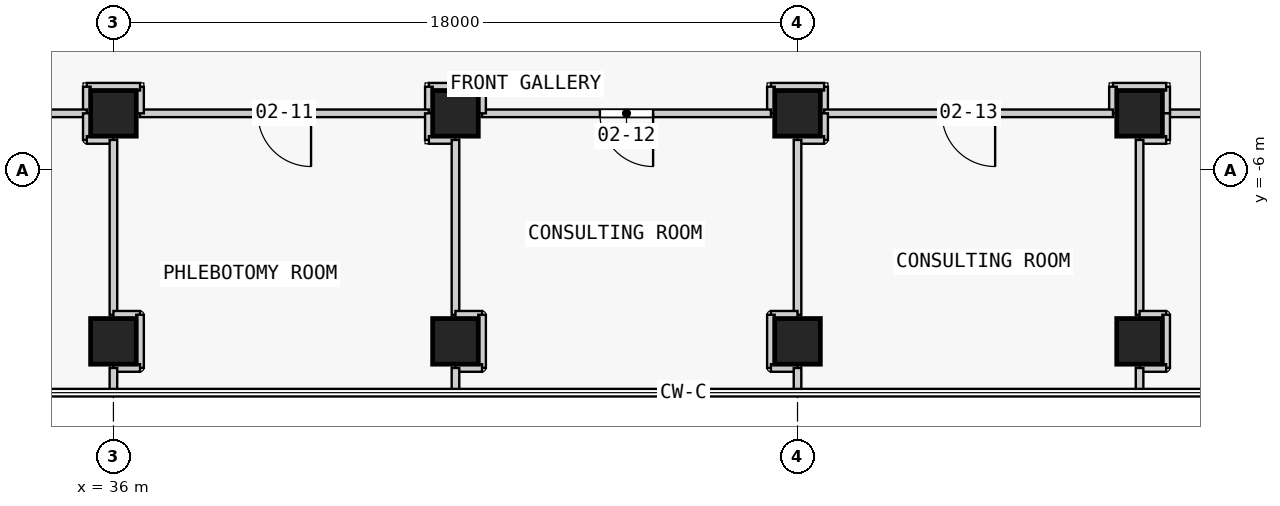
"""IFC4 building model, lengths in metres.
Left out: names, types, materials, properties, quantities, classifications, styles, units other than length and angle.
Written with IfcOpenShell. Run it as: python <this file> out.ifc"""

import sys

from ifc_helpers import new_model, si_unit, direction, frame, frame_2d, origin, origin_2d, place, context, subcontext, project, spatial, rectangle, extrude, element, fill, save


model = new_model("IFC4")
c1 = context("Model", 3, precision=1e-05, world=origin(), true_north=direction((0.0, 1.0)))
c2 = subcontext(c1, "Body", "Model", "MODEL_VIEW")
j1 = project(units=[si_unit("LENGTHUNIT", "METRE"), si_unit("PLANEANGLEUNIT", "RADIAN")], contexts=[c1])
p1 = place(None, origin())
s1 = spatial("IfcSite", under=j1, at=p1, CompositionType="ELEMENT")
p2 = place(p1, origin())
s2 = spatial("IfcBuilding", under=s1, at=p2, CompositionType="ELEMENT")
p3 = place(p2, frame((0.0, 0.0, 12.8)))
s3 = spatial("IfcBuildingStorey", under=s2, at=p3, CompositionType="ELEMENT", Elevation=12.8)
for number, where, z_axis, x_axis in (
    (1, (36.0, -10.5, 0.0), (0.0, 0.0, 1.0), (1.0, 0.0, 0.0)),
    (2, (36.0, -4.5, 0.0), (0.0, 0.0, 1.0), (1.0, 0.0, 0.0)),
    (3, (45.0, -10.5, 0.0), (0.0, 0.0, 1.0), (1.0, 0.0, 0.0)),
    (4, (45.0, -4.5, 0.0), (0.0, 0.0, 1.0), (1.0, 0.0, 0.0)),
    (5, (54.0, -10.5, 0.0), (0.0, 0.0, 1.0), (1.0, 0.0, 0.0)),
    (6, (54.0, -4.5, 0.0), (0.0, 0.0, 1.0), (1.0, 0.0, 0.0)),
    (7, (63.0, -10.5, 0.0), (0.0, 0.0, 1.0), (1.0, 0.0, 0.0)),
    (8, (63.0, -4.5, 0.0), (0.0, 0.0, 1.0), (1.0, 0.0, 0.0)),
):
    element("IfcColumn", number, at=place(p3, frame(where, z_axis=z_axis, x_axis=x_axis)), inside=s3, PredefinedType="COLUMN", context=c2, shape_type="SweptSolid", body=[
        extrude(rectangle(XDim=1.2, YDim=1.2, at=origin_2d()), origin(), (0.0, 0.0, 1.0), 4.5),
    ])
p4 = place(p3, frame((54.7, -4.5, 0.0), z_axis=(0.0, 0.0, 1.0), x_axis=(0.0, 1.0, 0.0)))
e9 = element("IfcWall", 9, at=p4, inside=s3, PredefinedType="PARTITIONING", context=c2, shape_type="SweptSolid", body=[
    extrude(rectangle(XDim=0.7, YDim=0.2, at=frame_2d((0.35, 0.0))), origin(), (0.0, 0.0, 1.0), 3.45),
])
p5 = place(p3, frame((54.7, -3.8, 0.0), z_axis=(0.0, 0.0, 1.0), x_axis=(-1.0, 0.0, 0.0)))
e10 = element("IfcWall", 10, at=p5, inside=s3, PredefinedType="PARTITIONING", context=c2, shape_type="SweptSolid", body=[
    extrude(rectangle(XDim=1.4, YDim=0.2, at=frame_2d((0.7, 0.0))), origin(), (0.0, 0.0, 1.0), 3.45),
])
p6 = place(p3, frame((53.3, -3.8, 0.0), z_axis=(0.0, 0.0, 1.0), x_axis=(0.0, -1.0, 0.0)))
e11 = element("IfcWall", 11, at=p6, inside=s3, PredefinedType="PARTITIONING", context=c2, shape_type="SweptSolid", body=[
    extrude(rectangle(XDim=0.7, YDim=0.2, at=frame_2d((0.35, 0.0))), origin(), (0.0, 0.0, 1.0), 3.45),
])
p7 = place(p3, frame((53.3, -4.5, 0.0), z_axis=(0.0, 0.0, 1.0), x_axis=(-1.0, 0.0, 0.0)))
e12 = element("IfcWall", 12, at=p7, inside=s3, PredefinedType="PARTITIONING", context=c2, shape_type="SweptSolid", body=[
    extrude(rectangle(XDim=7.6, YDim=0.2, at=frame_2d((3.8, 0.0))), origin(), (0.0, 0.0, 1.0), 3.45),
])
p8 = place(p7, frame((3.1, 0.0, 0.0)))
e13 = element("IfcOpeningElement", 13, at=p8, cuts=e12, PredefinedType="OPENING", context=c2, shape_type="SweptSolid", body=[
    extrude(rectangle(XDim=1.4, YDim=2.1, at=frame_2d((0.7, 1.05))), frame((0.0, 0.11, 0.0), z_axis=(0.0, -1.0, 0.0), x_axis=(1.0, 0.0, 0.0)), (0.0, 0.0, 1.0), 0.22),
])
p9 = place(p3, frame((45.7, -4.5, 0.0), z_axis=(0.0, 0.0, 1.0), x_axis=(0.0, 1.0, 0.0)))
e14 = element("IfcWall", 14, at=p9, inside=s3, PredefinedType="PARTITIONING", context=c2, shape_type="SweptSolid", body=[
    extrude(rectangle(XDim=0.7, YDim=0.2, at=frame_2d((0.35, 0.0))), origin(), (0.0, 0.0, 1.0), 3.45),
])
p10 = place(p3, frame((45.7, -3.8, 0.0), z_axis=(0.0, 0.0, 1.0), x_axis=(-1.0, 0.0, 0.0)))
e15 = element("IfcWall", 15, at=p10, inside=s3, PredefinedType="PARTITIONING", context=c2, shape_type="SweptSolid", body=[
    extrude(rectangle(XDim=1.4, YDim=0.2, at=frame_2d((0.7, 0.0))), origin(), (0.0, 0.0, 1.0), 3.45),
])
p11 = place(p3, frame((44.3, -3.8, 0.0), z_axis=(0.0, 0.0, 1.0), x_axis=(0.0, -1.0, 0.0)))
e16 = element("IfcWall", 16, at=p11, inside=s3, PredefinedType="PARTITIONING", context=c2, shape_type="SweptSolid", body=[
    extrude(rectangle(XDim=0.7, YDim=0.2, at=frame_2d((0.35, 0.0))), origin(), (0.0, 0.0, 1.0), 3.45),
])
p12 = place(p3, frame((74.0, -4.5, 0.0), z_axis=(0.0, 0.0, 1.0), x_axis=(-1.0, 0.0, 0.0)))
e17 = element("IfcWall", 17, at=p12, inside=s3, PredefinedType="PARTITIONING", context=c2, shape_type="SweptSolid", body=[
    extrude(rectangle(XDim=10.3, YDim=0.2, at=frame_2d((5.15, 0.0))), origin(), (0.0, 0.0, 1.0), 4.15),
])
p13 = place(p12, frame((4.35, 0.0, 0.0)))
e18 = element("IfcOpeningElement", 18, at=p13, cuts=e17, PredefinedType="OPENING", context=c2, shape_type="SweptSolid", body=[
    extrude(rectangle(XDim=1.4, YDim=2.1, at=frame_2d((0.7, 1.05))), frame((0.0, 0.11, 0.0), z_axis=(0.0, -1.0, 0.0), x_axis=(1.0, 0.0, 0.0)), (0.0, 0.0, 1.0), 0.22),
])
p14 = place(p3, frame((44.3, -4.5, 0.0), z_axis=(0.0, 0.0, 1.0), x_axis=(-1.0, 0.0, 0.0)))
e19 = element("IfcWall", 19, at=p14, inside=s3, PredefinedType="PARTITIONING", context=c2, shape_type="SweptSolid", body=[
    extrude(rectangle(XDim=7.6, YDim=0.2, at=frame_2d((3.8, 0.0))), origin(), (0.0, 0.0, 1.0), 3.45),
])
p15 = place(p14, frame((3.1, 0.0, 0.0)))
e20 = element("IfcOpeningElement", 20, at=p15, cuts=e19, PredefinedType="OPENING", context=c2, shape_type="SweptSolid", body=[
    extrude(rectangle(XDim=1.4, YDim=2.1, at=frame_2d((0.7, 1.05))), frame((0.0, 0.11, 0.0), z_axis=(0.0, -1.0, 0.0), x_axis=(1.0, 0.0, 0.0)), (0.0, 0.0, 1.0), 0.22),
])
p16 = place(p3, frame((36.7, -4.5, 0.0), z_axis=(0.0, 0.0, 1.0), x_axis=(0.0, 1.0, 0.0)))
e21 = element("IfcWall", 21, at=p16, inside=s3, PredefinedType="PARTITIONING", context=c2, shape_type="SweptSolid", body=[
    extrude(rectangle(XDim=0.7, YDim=0.2, at=frame_2d((0.35, 0.0))), origin(), (0.0, 0.0, 1.0), 3.45),
])
p17 = place(p3, frame((36.7, -3.8, 0.0), z_axis=(0.0, 0.0, 1.0), x_axis=(-1.0, 0.0, 0.0)))
e22 = element("IfcWall", 22, at=p17, inside=s3, PredefinedType="PARTITIONING", context=c2, shape_type="SweptSolid", body=[
    extrude(rectangle(XDim=1.4, YDim=0.2, at=frame_2d((0.7, 0.0))), origin(), (0.0, 0.0, 1.0), 3.45),
])
p18 = place(p3, frame((35.3, -3.8, 0.0), z_axis=(0.0, 0.0, 1.0), x_axis=(0.0, -1.0, 0.0)))
e23 = element("IfcWall", 23, at=p18, inside=s3, PredefinedType="PARTITIONING", context=c2, shape_type="SweptSolid", body=[
    extrude(rectangle(XDim=0.7, YDim=0.2, at=frame_2d((0.35, 0.0))), origin(), (0.0, 0.0, 1.0), 3.45),
])
p19 = place(p3, frame((63.7, -4.5, 0.0), z_axis=(0.0, 0.0, 1.0), x_axis=(0.0, 1.0, 0.0)))
e24 = element("IfcWall", 24, at=p19, inside=s3, PredefinedType="PARTITIONING", context=c2, shape_type="SweptSolid", body=[
    extrude(rectangle(XDim=0.7, YDim=0.2, at=frame_2d((0.35, 0.0))), origin(), (0.0, 0.0, 1.0), 4.15),
])
p20 = place(p3, frame((63.7, -3.8, 0.0), z_axis=(0.0, 0.0, 1.0), x_axis=(-1.0, 0.0, 0.0)))
e25 = element("IfcWall", 25, at=p20, inside=s3, PredefinedType="PARTITIONING", context=c2, shape_type="SweptSolid", body=[
    extrude(rectangle(XDim=1.4, YDim=0.2, at=frame_2d((0.7, 0.0))), origin(), (0.0, 0.0, 1.0), 3.45),
])
p21 = place(p3, frame((62.3, -3.8, 0.0), z_axis=(0.0, 0.0, 1.0), x_axis=(0.0, -1.0, 0.0)))
e26 = element("IfcWall", 26, at=p21, inside=s3, PredefinedType="PARTITIONING", context=c2, shape_type="SweptSolid", body=[
    extrude(rectangle(XDim=0.7, YDim=0.2, at=frame_2d((0.35, 0.0))), origin(), (0.0, 0.0, 1.0), 3.45),
])
p22 = place(p3, frame((62.3, -4.5, 0.0), z_axis=(0.0, 0.0, 1.0), x_axis=(-1.0, 0.0, 0.0)))
e27 = element("IfcWall", 27, at=p22, inside=s3, PredefinedType="PARTITIONING", context=c2, shape_type="SweptSolid", body=[
    extrude(rectangle(XDim=7.6, YDim=0.2, at=frame_2d((3.8, 0.0))), origin(), (0.0, 0.0, 1.0), 3.45),
])
p23 = place(p22, frame((3.1, 0.0, 0.0)))
e28 = element("IfcOpeningElement", 28, at=p23, cuts=e27, PredefinedType="OPENING", context=c2, shape_type="SweptSolid", body=[
    extrude(rectangle(XDim=1.4, YDim=2.1, at=frame_2d((0.7, 1.05))), frame((0.0, 0.11, 0.0), z_axis=(0.0, -1.0, 0.0), x_axis=(1.0, 0.0, 0.0)), (0.0, 0.0, 1.0), 0.22),
])
p24 = place(p3, frame((35.3, -4.5, 0.0), z_axis=(0.0, 0.0, 1.0), x_axis=(-1.0, 0.0, 0.0)))
e29 = element("IfcWall", 29, at=p24, inside=s3, PredefinedType="PARTITIONING", context=c2, shape_type="SweptSolid", body=[
    extrude(rectangle(XDim=7.6, YDim=0.2, at=frame_2d((3.8, 0.0))), origin(), (0.0, 0.0, 1.0), 3.45),
])
p25 = place(p24, frame((3.1, 0.0, 0.0)))
e30 = element("IfcOpeningElement", 30, at=p25, cuts=e29, PredefinedType="OPENING", context=c2, shape_type="SweptSolid", body=[
    extrude(rectangle(XDim=1.4, YDim=2.1, at=frame_2d((0.7, 1.05))), frame((0.0, 0.11, 0.0), z_axis=(0.0, -1.0, 0.0), x_axis=(1.0, 0.0, 0.0)), (0.0, 0.0, 1.0), 0.22),
])
for number, where, z_axis, x_axis in (
    (31, (44.3, -4.5, 0.0), (0.0, 0.0, 1.0), (0.0, -1.0, 0.0)),
    (32, (44.3, -5.2, 0.0), (0.0, 0.0, 1.0), (1.0, 0.0, 0.0)),
):
    element("IfcWall", number, at=place(p3, frame(where, z_axis=z_axis, x_axis=x_axis)), inside=s3, PredefinedType="PARTITIONING", context=c2, shape_type="SweptSolid", body=[
        extrude(rectangle(XDim=0.7, YDim=0.2, at=frame_2d((0.35, 0.0))), origin(), (0.0, 0.0, 1.0), 3.45),
    ])
p26 = place(p3, frame((45.0, -5.2, 0.0), z_axis=(0.0, 0.0, 1.0), x_axis=(0.0, -1.0, 0.0)))
e33 = element("IfcWall", 33, at=p26, inside=s3, PredefinedType="PARTITIONING", context=c2, shape_type="SweptSolid", body=[
    extrude(rectangle(XDim=4.6, YDim=0.2, at=frame_2d((2.3, 0.0))), origin(), (0.0, 0.0, 1.0), 3.45),
])
p27 = place(p3, frame((45.0, -9.8, 0.0), z_axis=(0.0, 0.0, 1.0), x_axis=(1.0, 0.0, 0.0)))
e34 = element("IfcWall", 34, at=p27, inside=s3, PredefinedType="PARTITIONING", context=c2, shape_type="SweptSolid", body=[
    extrude(rectangle(XDim=0.7, YDim=0.2, at=frame_2d((0.35, 0.0))), origin(), (0.0, 0.0, 1.0), 3.45),
])
p28 = place(p3, frame((45.7, -9.8, 0.0), z_axis=(0.0, 0.0, 1.0), x_axis=(0.0, -1.0, 0.0)))
e35 = element("IfcWall", 35, at=p28, inside=s3, PredefinedType="PARTITIONING", context=c2, shape_type="SweptSolid", body=[
    extrude(rectangle(XDim=1.4, YDim=0.2, at=frame_2d((0.7, 0.0))), origin(), (0.0, 0.0, 1.0), 3.45),
])
p29 = place(p3, frame((45.7, -11.2, 0.0), z_axis=(0.0, 0.0, 1.0), x_axis=(-1.0, 0.0, 0.0)))
e36 = element("IfcWall", 36, at=p29, inside=s3, PredefinedType="PARTITIONING", context=c2, shape_type="SweptSolid", body=[
    extrude(rectangle(XDim=0.7, YDim=0.2, at=frame_2d((0.35, 0.0))), origin(), (0.0, 0.0, 1.0), 4.15),
])
p30 = place(p3, frame((45.0, -11.2, 0.0), z_axis=(0.0, 0.0, 1.0), x_axis=(0.0, -1.0, 0.0)))
e37 = element("IfcWall", 37, at=p30, inside=s3, PredefinedType="PARTITIONING", context=c2, shape_type="SweptSolid", body=[
    extrude(rectangle(XDim=0.65, YDim=0.2, at=frame_2d((0.325, 0.0))), origin(), (0.0, 0.0, 1.0), 4.15),
])
for number, where, z_axis, x_axis in (
    (38, (54.7, -4.5, 0.0), (0.0, 0.0, 1.0), (0.0, -1.0, 0.0)),
    (39, (54.7, -5.2, 0.0), (0.0, 0.0, 1.0), (-1.0, 0.0, 0.0)),
):
    element("IfcWall", number, at=place(p3, frame(where, z_axis=z_axis, x_axis=x_axis)), inside=s3, PredefinedType="PARTITIONING", context=c2, shape_type="SweptSolid", body=[
        extrude(rectangle(XDim=0.7, YDim=0.2, at=frame_2d((0.35, 0.0))), origin(), (0.0, 0.0, 1.0), 3.45),
    ])
p31 = place(p3, frame((54.0, -5.2, 0.0), z_axis=(0.0, 0.0, 1.0), x_axis=(0.0, -1.0, 0.0)))
e40 = element("IfcWall", 40, at=p31, inside=s3, PredefinedType="PARTITIONING", context=c2, shape_type="SweptSolid", body=[
    extrude(rectangle(XDim=4.6, YDim=0.2, at=frame_2d((2.3, 0.0))), origin(), (0.0, 0.0, 1.0), 3.45),
])
p32 = place(p3, frame((54.0, -9.8, 0.0), z_axis=(0.0, 0.0, 1.0), x_axis=(-1.0, 0.0, 0.0)))
e41 = element("IfcWall", 41, at=p32, inside=s3, PredefinedType="PARTITIONING", context=c2, shape_type="SweptSolid", body=[
    extrude(rectangle(XDim=0.7, YDim=0.2, at=frame_2d((0.35, 0.0))), origin(), (0.0, 0.0, 1.0), 3.45),
])
p33 = place(p3, frame((53.3, -9.8, 0.0), z_axis=(0.0, 0.0, 1.0), x_axis=(0.0, -1.0, 0.0)))
e42 = element("IfcWall", 42, at=p33, inside=s3, PredefinedType="PARTITIONING", context=c2, shape_type="SweptSolid", body=[
    extrude(rectangle(XDim=1.4, YDim=0.2, at=frame_2d((0.7, 0.0))), origin(), (0.0, 0.0, 1.0), 3.45),
])
p34 = place(p3, frame((53.3, -11.2, 0.0), z_axis=(0.0, 0.0, 1.0), x_axis=(1.0, 0.0, 0.0)))
e43 = element("IfcWall", 43, at=p34, inside=s3, PredefinedType="PARTITIONING", context=c2, shape_type="SweptSolid", body=[
    extrude(rectangle(XDim=0.7, YDim=0.2, at=frame_2d((0.35, 0.0))), origin(), (0.0, 0.0, 1.0), 4.15),
])
p35 = place(p3, frame((54.0, -11.2, 0.0), z_axis=(0.0, 0.0, 1.0), x_axis=(0.0, -1.0, 0.0)))
e44 = element("IfcWall", 44, at=p35, inside=s3, PredefinedType="PARTITIONING", context=c2, shape_type="SweptSolid", body=[
    extrude(rectangle(XDim=0.65, YDim=0.2, at=frame_2d((0.325, 0.0))), origin(), (0.0, 0.0, 1.0), 4.15),
])
p36 = place(p3, frame((63.7, -4.5, 0.0), z_axis=(0.0, 0.0, 1.0), x_axis=(0.0, -1.0, 0.0)))
e45 = element("IfcWall", 45, at=p36, inside=s3, PredefinedType="PARTITIONING", context=c2, shape_type="SweptSolid", body=[
    extrude(rectangle(XDim=0.7, YDim=0.2, at=frame_2d((0.35, 0.0))), origin(), (0.0, 0.0, 1.0), 4.15),
])
p37 = place(p3, frame((63.7, -5.2, 0.0), z_axis=(0.0, 0.0, 1.0), x_axis=(-1.0, 0.0, 0.0)))
e46 = element("IfcWall", 46, at=p37, inside=s3, PredefinedType="PARTITIONING", context=c2, shape_type="SweptSolid", body=[
    extrude(rectangle(XDim=0.7, YDim=0.2, at=frame_2d((0.35, 0.0))), origin(), (0.0, 0.0, 1.0), 3.45),
])
p38 = place(p3, frame((63.0, -5.2, 0.0), z_axis=(0.0, 0.0, 1.0), x_axis=(0.0, -1.0, 0.0)))
e47 = element("IfcWall", 47, at=p38, inside=s3, PredefinedType="PARTITIONING", context=c2, shape_type="SweptSolid", body=[
    extrude(rectangle(XDim=4.6, YDim=0.2, at=frame_2d((2.3, 0.0))), origin(), (0.0, 0.0, 1.0), 3.45),
])
p39 = place(p3, frame((63.0, -9.8, 0.0), z_axis=(0.0, 0.0, 1.0), x_axis=(1.0, 0.0, 0.0)))
e48 = element("IfcWall", 48, at=p39, inside=s3, PredefinedType="PARTITIONING", context=c2, shape_type="SweptSolid", body=[
    extrude(rectangle(XDim=0.7, YDim=0.2, at=frame_2d((0.35, 0.0))), origin(), (0.0, 0.0, 1.0), 3.45),
])
p40 = place(p3, frame((63.7, -9.8, 0.0), z_axis=(0.0, 0.0, 1.0), x_axis=(0.0, -1.0, 0.0)))
e49 = element("IfcWall", 49, at=p40, inside=s3, PredefinedType="PARTITIONING", context=c2, shape_type="SweptSolid", body=[
    extrude(rectangle(XDim=1.4, YDim=0.2, at=frame_2d((0.7, 0.0))), origin(), (0.0, 0.0, 1.0), 3.45),
])
p41 = place(p3, frame((63.7, -11.2, 0.0), z_axis=(0.0, 0.0, 1.0), x_axis=(-1.0, 0.0, 0.0)))
e50 = element("IfcWall", 50, at=p41, inside=s3, PredefinedType="PARTITIONING", context=c2, shape_type="SweptSolid", body=[
    extrude(rectangle(XDim=0.7, YDim=0.2, at=frame_2d((0.35, 0.0))), origin(), (0.0, 0.0, 1.0), 4.15),
])
p42 = place(p3, frame((63.0, -11.2, 0.0), z_axis=(0.0, 0.0, 1.0), x_axis=(0.0, -1.0, 0.0)))
e51 = element("IfcWall", 51, at=p42, inside=s3, PredefinedType="PARTITIONING", context=c2, shape_type="SweptSolid", body=[
    extrude(rectangle(XDim=0.65, YDim=0.2, at=frame_2d((0.325, 0.0))), origin(), (0.0, 0.0, 1.0), 4.15),
])
for number, where, z_axis, x_axis in (
    (52, (35.3, -4.5, 0.0), (0.0, 0.0, 1.0), (0.0, -1.0, 0.0)),
    (53, (35.3, -5.2, 0.0), (0.0, 0.0, 1.0), (1.0, 0.0, 0.0)),
):
    element("IfcWall", number, at=place(p3, frame(where, z_axis=z_axis, x_axis=x_axis)), inside=s3, PredefinedType="PARTITIONING", context=c2, shape_type="SweptSolid", body=[
        extrude(rectangle(XDim=0.7, YDim=0.2, at=frame_2d((0.35, 0.0))), origin(), (0.0, 0.0, 1.0), 3.45),
    ])
p43 = place(p3, frame((36.0, -5.2, 0.0), z_axis=(0.0, 0.0, 1.0), x_axis=(0.0, -1.0, 0.0)))
e54 = element("IfcWall", 54, at=p43, inside=s3, PredefinedType="PARTITIONING", context=c2, shape_type="SweptSolid", body=[
    extrude(rectangle(XDim=4.6, YDim=0.2, at=frame_2d((2.3, 0.0))), origin(), (0.0, 0.0, 1.0), 3.45),
])
p44 = place(p3, frame((36.0, -9.8, 0.0), z_axis=(0.0, 0.0, 1.0), x_axis=(1.0, 0.0, 0.0)))
e55 = element("IfcWall", 55, at=p44, inside=s3, PredefinedType="PARTITIONING", context=c2, shape_type="SweptSolid", body=[
    extrude(rectangle(XDim=0.7, YDim=0.2, at=frame_2d((0.35, 0.0))), origin(), (0.0, 0.0, 1.0), 3.45),
])
p45 = place(p3, frame((36.7, -9.8, 0.0), z_axis=(0.0, 0.0, 1.0), x_axis=(0.0, -1.0, 0.0)))
e56 = element("IfcWall", 56, at=p45, inside=s3, PredefinedType="PARTITIONING", context=c2, shape_type="SweptSolid", body=[
    extrude(rectangle(XDim=1.4, YDim=0.2, at=frame_2d((0.7, 0.0))), origin(), (0.0, 0.0, 1.0), 3.45),
])
p46 = place(p3, frame((36.7, -11.2, 0.0), z_axis=(0.0, 0.0, 1.0), x_axis=(-1.0, 0.0, 0.0)))
e57 = element("IfcWall", 57, at=p46, inside=s3, PredefinedType="PARTITIONING", context=c2, shape_type="SweptSolid", body=[
    extrude(rectangle(XDim=0.7, YDim=0.2, at=frame_2d((0.35, 0.0))), origin(), (0.0, 0.0, 1.0), 4.15),
])
p47 = place(p3, frame((36.0, -11.2, 0.0), z_axis=(0.0, 0.0, 1.0), x_axis=(0.0, -1.0, 0.0)))
e58 = element("IfcWall", 58, at=p47, inside=s3, PredefinedType="PARTITIONING", context=c2, shape_type="SweptSolid", body=[
    extrude(rectangle(XDim=0.65, YDim=0.2, at=frame_2d((0.325, 0.0))), origin(), (0.0, 0.0, 1.0), 4.15),
])
p48 = place(p15, origin())
e59 = element("IfcDoor", 59, at=p48, inside=s3, OperationType="SINGLE_SWING_LEFT", PredefinedType="DOOR", context=c2, shape_type="SweptSolid", body=[
    extrude(rectangle(XDim=1.4, YDim=2.1, at=frame_2d((0.7, 1.05))), frame((0.0, 0.025, 0.0), z_axis=(0.0, -1.0, 0.0), x_axis=(1.0, 0.0, 0.0)), (0.0, 0.0, 1.0), 0.05),
])
fill(e20, e59)
p49 = place(p8, origin())
e60 = element("IfcDoor", 60, at=p49, inside=s3, OperationType="SINGLE_SWING_LEFT", PredefinedType="DOOR", context=c2, shape_type="SweptSolid", body=[
    extrude(rectangle(XDim=1.4, YDim=2.1, at=frame_2d((0.7, 1.05))), frame((0.0, 0.025, 0.0), z_axis=(0.0, -1.0, 0.0), x_axis=(1.0, 0.0, 0.0)), (0.0, 0.0, 1.0), 0.05),
])
fill(e13, e60)
p50 = place(p23, origin())
e61 = element("IfcDoor", 61, at=p50, inside=s3, OperationType="SINGLE_SWING_LEFT", PredefinedType="DOOR", context=c2, shape_type="SweptSolid", body=[
    extrude(rectangle(XDim=1.4, YDim=2.1, at=frame_2d((0.7, 1.05))), frame((0.0, 0.025, 0.0), z_axis=(0.0, -1.0, 0.0), x_axis=(1.0, 0.0, 0.0)), (0.0, 0.0, 1.0), 0.05),
])
fill(e28, e61)
save(model, sys.argv[1])
